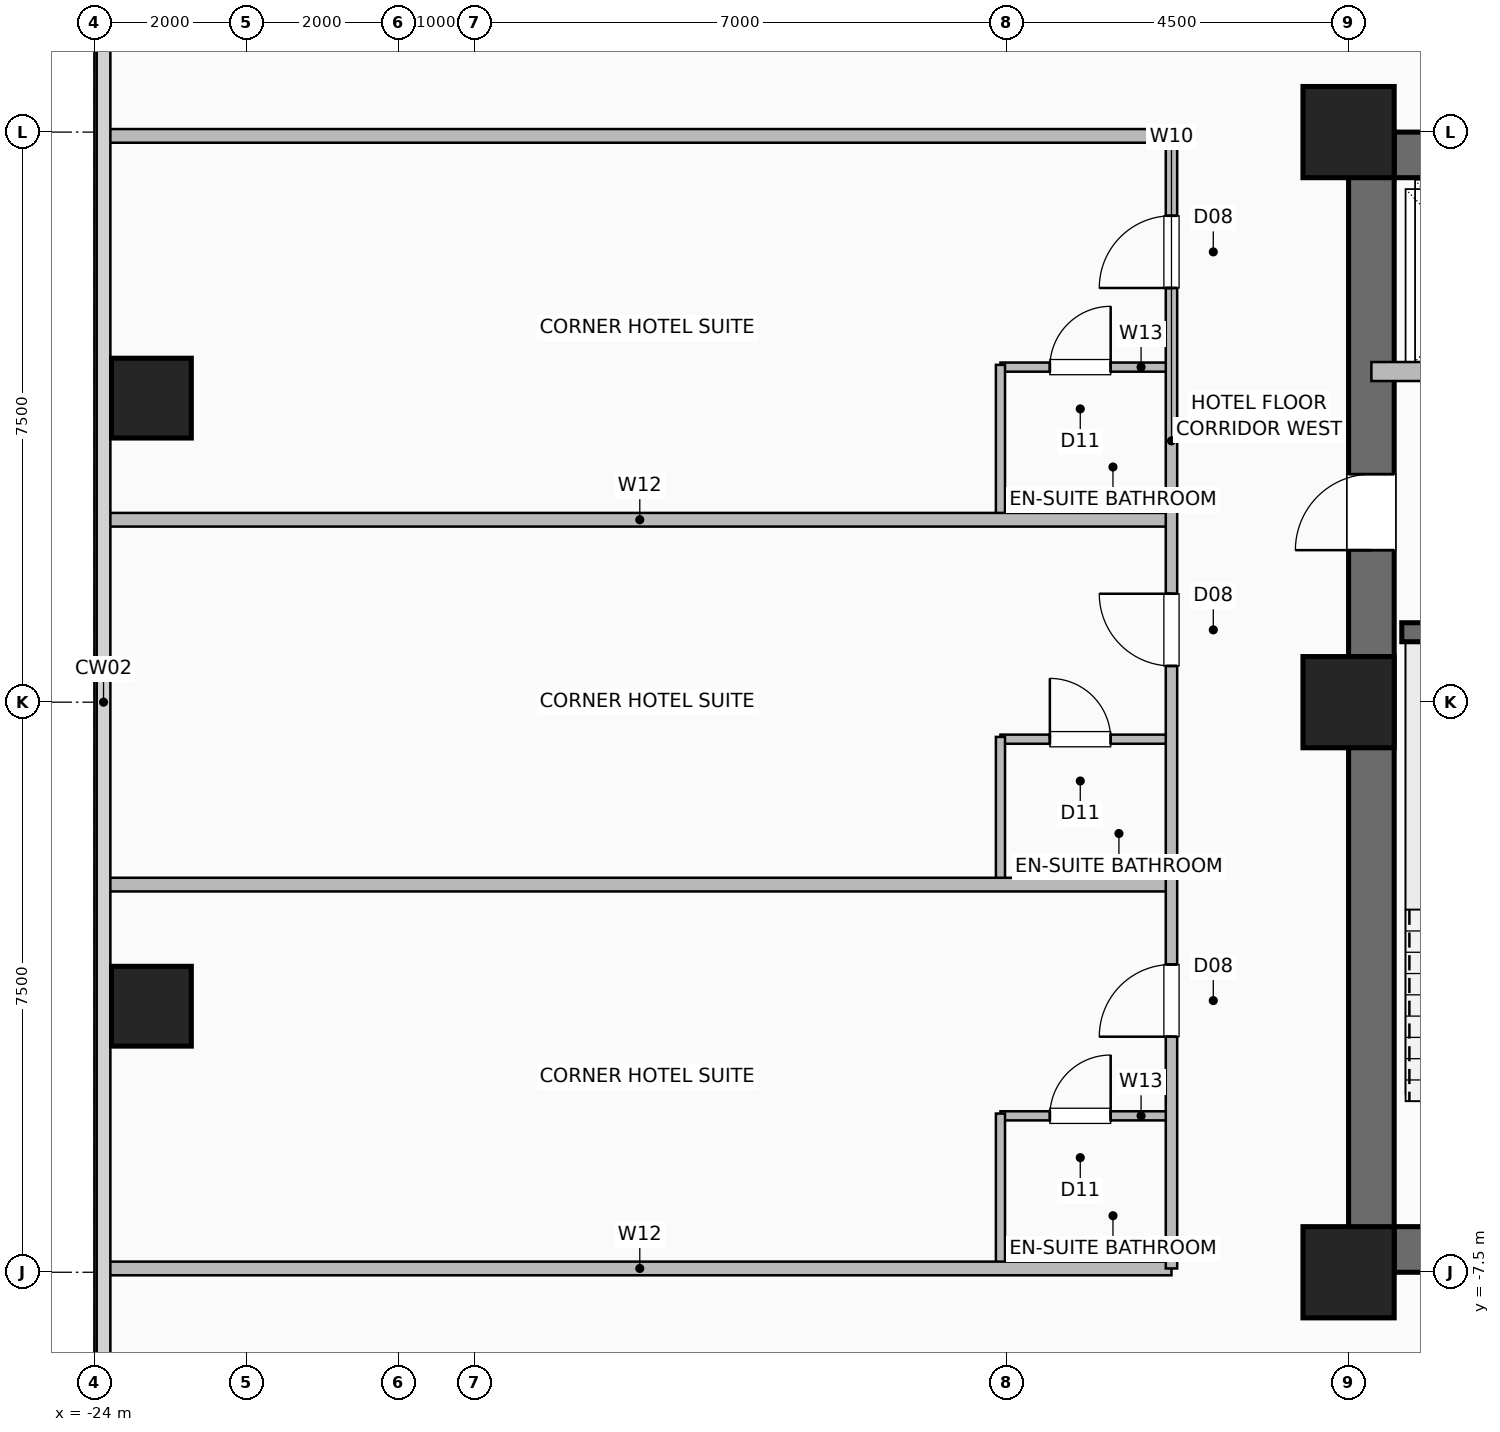
"""IFC4 building model, lengths in metres.
Left out: names, types, materials, properties, quantities, classifications, styles, units other than length and angle.
Written with IfcOpenShell. Run it as: python <this file> out.ifc"""

import sys

from ifc_helpers import new_model, si_unit, direction, frame, frame_2d, origin, origin_2d, place, context, subcontext, project, spatial, rectangle, hollow_rectangle, extrude, element, fill, save


model = new_model("IFC4")
c1 = context("Model", 3, precision=1e-05, world=origin(), true_north=direction((0.0, 1.0)))
c2 = subcontext(c1, "Body", "Model", "MODEL_VIEW")
j1 = project(units=[si_unit("LENGTHUNIT", "METRE"), si_unit("PLANEANGLEUNIT", "RADIAN")], contexts=[c1])
p1 = place(None, origin())
s1 = spatial("IfcSite", under=j1, at=p1, CompositionType="ELEMENT")
p2 = place(p1, origin())
s2 = spatial("IfcBuilding", under=s1, at=p2, CompositionType="ELEMENT")
p3 = place(p2, frame((0.0, 0.0, 51.5)))
s3 = spatial("IfcBuildingStorey", under=s2, at=p3, CompositionType="ELEMENT", Elevation=51.5)
for number, where, z_axis, x_axis in (
    (1, (-7.5, -7.5, 0.0), (0.0, 0.0, 1.0), (1.0, 0.0, 0.0)),
    (2, (-7.5, 7.5, 0.0), (0.0, 0.0, 1.0), (1.0, 0.0, 0.0)),
    (3, (-7.5, 0.0, 0.0), (0.0, 0.0, 1.0), (1.0, 0.0, 0.0)),
):
    element("IfcColumn", number, at=place(p3, frame(where, z_axis=z_axis, x_axis=x_axis)), inside=s3, PredefinedType="COLUMN", context=c2, shape_type="SweptSolid", body=[
        extrude(hollow_rectangle(XDim=1.2, YDim=1.2, WallThickness=0.055, at=origin_2d()), origin(), (0.0, 0.0, 1.0), 3.5),
    ])
for number, where, z_axis, x_axis in (
    (4, (-23.25, -4.0, 0.0), (0.0, 0.0, 1.0), (1.0, 0.0, 0.0)),
    (5, (-23.25, 4.0, 0.0), (0.0, 0.0, 1.0), (1.0, 0.0, 0.0)),
):
    element("IfcColumn", number, at=place(p3, frame(where, z_axis=z_axis, x_axis=x_axis)), inside=s3, PredefinedType="COLUMN", context=c2, shape_type="SweptSolid", body=[
        extrude(hollow_rectangle(XDim=1.05, YDim=1.05, WallThickness=0.05, at=origin_2d()), origin(), (0.0, 0.0, 1.0), 3.5),
    ])
p4 = place(p3, frame((-7.5, -7.2, 0.0), z_axis=(0.0, 0.0, 1.0), x_axis=(1.0, 0.0, 0.0)))
e6 = element("IfcWall", 6, at=p4, inside=s3, PredefinedType="SHEAR", context=c2, shape_type="SweptSolid", body=[
    extrude(rectangle(XDim=15.0, YDim=0.6, at=frame_2d((7.5, 0.0))), origin(), (0.0, 0.0, 1.0), 3.25),
])
p5 = place(p4, frame((1.55, 0.0, 0.0)))
e7 = element("IfcOpeningElement", 7, at=p5, cuts=e6, PredefinedType="OPENING", context=c2, shape_type="SweptSolid", body=[
    extrude(rectangle(XDim=1.05, YDim=2.08, at=frame_2d((0.525, 1.04))), frame((0.0, 0.31, 0.0), z_axis=(0.0, -1.0, 0.0), x_axis=(1.0, 0.0, 0.0)), (0.0, 0.0, 1.0), 0.62),
])
p6 = place(p4, frame((12.4, 0.0, 0.0)))
e8 = element("IfcOpeningElement", 8, at=p6, cuts=e6, PredefinedType="OPENING", context=c2, shape_type="SweptSolid", body=[
    extrude(rectangle(XDim=1.05, YDim=2.08, at=frame_2d((0.525, 1.04))), frame((0.0, 0.31, 0.0), z_axis=(0.0, -1.0, 0.0), x_axis=(1.0, 0.0, 0.0)), (0.0, 0.0, 1.0), 0.62),
])
p7 = place(p4, frame((4.64, 0.0, 0.0)))
e9 = element("IfcOpeningElement", 9, at=p7, cuts=e6, PredefinedType="OPENING", context=c2, shape_type="SweptSolid", body=[
    extrude(rectangle(XDim=1.1, YDim=2.2, at=frame_2d((0.55, 1.1))), frame((0.0, 0.31, 0.0), z_axis=(0.0, -1.0, 0.0), x_axis=(1.0, 0.0, 0.0)), (0.0, 0.0, 1.0), 0.62),
])
p8 = place(p4, frame((6.52, 0.0, 0.0)))
e10 = element("IfcOpeningElement", 10, at=p8, cuts=e6, PredefinedType="OPENING", context=c2, shape_type="SweptSolid", body=[
    extrude(rectangle(XDim=1.1, YDim=2.2, at=frame_2d((0.55, 1.1))), frame((0.0, 0.31, 0.0), z_axis=(0.0, -1.0, 0.0), x_axis=(1.0, 0.0, 0.0)), (0.0, 0.0, 1.0), 0.62),
])
p9 = place(p4, frame((8.4, 0.0, 0.0)))
e11 = element("IfcOpeningElement", 11, at=p9, cuts=e6, PredefinedType="OPENING", context=c2, shape_type="SweptSolid", body=[
    extrude(rectangle(XDim=1.1, YDim=2.2, at=frame_2d((0.55, 1.1))), frame((0.0, 0.31, 0.0), z_axis=(0.0, -1.0, 0.0), x_axis=(1.0, 0.0, 0.0)), (0.0, 0.0, 1.0), 0.62),
])
p10 = place(p3, frame((-7.5, 7.2, 0.0), z_axis=(0.0, 0.0, 1.0), x_axis=(1.0, 0.0, 0.0)))
e12 = element("IfcWall", 12, at=p10, inside=s3, PredefinedType="SHEAR", context=c2, shape_type="SweptSolid", body=[
    extrude(rectangle(XDim=15.0, YDim=0.6, at=frame_2d((7.5, 0.0))), origin(), (0.0, 0.0, 1.0), 3.25),
])
p11 = place(p3, frame((-7.2, -7.5, 0.0), z_axis=(0.0, 0.0, 1.0), x_axis=(0.0, 1.0, 0.0)))
e13 = element("IfcWall", 13, at=p11, inside=s3, PredefinedType="SHEAR", context=c2, shape_type="SweptSolid", body=[
    extrude(rectangle(XDim=15.0, YDim=0.6, at=frame_2d((7.5, 0.0))), origin(), (0.0, 0.0, 1.0), 3.25),
])
p12 = place(p11, frame((9.5, 0.0, 0.0)))
e14 = element("IfcOpeningElement", 14, at=p12, cuts=e13, PredefinedType="OPENING", context=c2, shape_type="SweptSolid", body=[
    extrude(rectangle(XDim=1.0, YDim=2.08, at=frame_2d((0.5, 1.04))), frame((0.0, 0.31, 0.0), z_axis=(0.0, -1.0, 0.0), x_axis=(1.0, 0.0, 0.0)), (0.0, 0.0, 1.0), 0.62),
])
p13 = place(p3, frame((-6.8, 0.92, 0.0), z_axis=(0.0, 0.0, 1.0), x_axis=(1.0, 0.0, 0.0)))
e15 = element("IfcWall", 15, at=p13, inside=s3, PredefinedType="SHEAR", context=c2, shape_type="SweptSolid", body=[
    extrude(rectangle(XDim=3.33, YDim=0.25, at=frame_2d((1.665, 0.0))), origin(), (0.0, 0.0, 1.0), 3.25),
])
p14 = place(p3, frame((-7.2, 4.35, 0.0), z_axis=(0.0, 0.0, 1.0), x_axis=(1.0, 0.0, 0.0)))
e16 = element("IfcWall", 16, at=p14, inside=s3, PredefinedType="SHEAR", context=c2, shape_type="SweptSolid", body=[
    extrude(rectangle(XDim=2.7, YDim=0.25, at=frame_2d((1.35, 0.0))), origin(), (0.0, 0.0, 1.0), 3.25),
])
p15 = place(p14, frame((0.75, 0.0, 0.0)))
e17 = element("IfcOpeningElement", 17, at=p15, cuts=e16, PredefinedType="OPENING", context=c2, shape_type="SweptSolid", body=[
    extrude(rectangle(XDim=1.2, YDim=2.2, at=frame_2d((0.6, 1.1))), frame((0.0, 0.135, 0.0), z_axis=(0.0, -1.0, 0.0), x_axis=(1.0, 0.0, 0.0)), (0.0, 0.0, 1.0), 0.27),
])
p16 = place(p3, frame((-12.08, -5.442, 0.0), z_axis=(0.0, 0.0, 1.0), x_axis=(1.0, 0.0, 0.0)))
e18 = element("IfcWall", 18, at=p16, inside=s3, PredefinedType="PLUMBINGWALL", context=c2, shape_type="SweptSolid", body=[
    extrude(rectangle(XDim=2.25, YDim=0.12, at=frame_2d((1.125, 0.0))), origin(), (0.0, 0.0, 1.0), 3.25),
])
p17 = place(p16, frame((0.65, 0.0, 0.0)))
e19 = element("IfcOpeningElement", 19, at=p17, cuts=e18, PredefinedType="OPENING", context=c2, shape_type="SweptSolid", body=[
    extrude(rectangle(XDim=0.8, YDim=2.05, at=frame_2d((0.4, 1.025))), frame((0.0, 0.07, 0.0), z_axis=(0.0, -1.0, 0.0), x_axis=(1.0, 0.0, 0.0)), (0.0, 0.0, 1.0), 0.14),
])
p18 = place(p3, frame((-12.08, -7.42, 0.0), z_axis=(0.0, 0.0, 1.0), x_axis=(0.0, 1.0, 0.0)))
e20 = element("IfcWall", 20, at=p18, inside=s3, PredefinedType="PLUMBINGWALL", context=c2, shape_type="SweptSolid", body=[
    extrude(rectangle(XDim=2.008, YDim=0.12, at=frame_2d((1.004, 0.0))), origin(), (0.0, 0.0, 1.0), 3.25),
])
p19 = place(p3, frame((-12.08, -0.487, 0.0), z_axis=(0.0, 0.0, 1.0), x_axis=(1.0, 0.0, 0.0)))
e21 = element("IfcWall", 21, at=p19, inside=s3, PredefinedType="PLUMBINGWALL", context=c2, shape_type="SweptSolid", body=[
    extrude(rectangle(XDim=2.25, YDim=0.12, at=frame_2d((1.125, 0.0))), origin(), (0.0, 0.0, 1.0), 3.25),
])
p20 = place(p19, frame((0.65, 0.0, 0.0)))
e22 = element("IfcOpeningElement", 22, at=p20, cuts=e21, PredefinedType="OPENING", context=c2, shape_type="SweptSolid", body=[
    extrude(rectangle(XDim=0.8, YDim=2.05, at=frame_2d((0.4, 1.025))), frame((0.0, 0.07, 0.0), z_axis=(0.0, -1.0, 0.0), x_axis=(1.0, 0.0, 0.0)), (0.0, 0.0, 1.0), 0.14),
])
p21 = place(p3, frame((-12.08, -2.37, 0.0), z_axis=(0.0, 0.0, 1.0), x_axis=(0.0, 1.0, 0.0)))
e23 = element("IfcWall", 23, at=p21, inside=s3, PredefinedType="PLUMBINGWALL", context=c2, shape_type="SweptSolid", body=[
    extrude(rectangle(XDim=1.913, YDim=0.12, at=frame_2d((0.957, 0.0))), origin(), (0.0, 0.0, 1.0), 3.25),
])
p22 = place(p3, frame((-12.08, 4.408, 0.0), z_axis=(0.0, 0.0, 1.0), x_axis=(1.0, 0.0, 0.0)))
e24 = element("IfcWall", 24, at=p22, inside=s3, PredefinedType="PLUMBINGWALL", context=c2, shape_type="SweptSolid", body=[
    extrude(rectangle(XDim=2.25, YDim=0.12, at=frame_2d((1.125, 0.0))), origin(), (0.0, 0.0, 1.0), 3.25),
])
p23 = place(p22, frame((0.65, 0.0, 0.0)))
e25 = element("IfcOpeningElement", 25, at=p23, cuts=e24, PredefinedType="OPENING", context=c2, shape_type="SweptSolid", body=[
    extrude(rectangle(XDim=0.8, YDim=2.05, at=frame_2d((0.4, 1.025))), frame((0.0, 0.07, 0.0), z_axis=(0.0, -1.0, 0.0), x_axis=(1.0, 0.0, 0.0)), (0.0, 0.0, 1.0), 0.14),
])
p24 = place(p3, frame((-12.08, 2.43, 0.0), z_axis=(0.0, 0.0, 1.0), x_axis=(0.0, 1.0, 0.0)))
e26 = element("IfcWall", 26, at=p24, inside=s3, PredefinedType="PLUMBINGWALL", context=c2, shape_type="SweptSolid", body=[
    extrude(rectangle(XDim=2.008, YDim=0.12, at=frame_2d((1.004, 0.0))), origin(), (0.0, 0.0, 1.0), 3.25),
])
for number, where, z_axis, x_axis in (
    (27, (-23.82, -7.45, 0.0), (0.0, 0.0, 1.0), (1.0, 0.0, 0.0)),
    (28, (-23.82, -2.4, 0.0), (0.0, 0.0, 1.0), (1.0, 0.0, 0.0)),
    (29, (-23.82, 2.4, 0.0), (0.0, 0.0, 1.0), (1.0, 0.0, 0.0)),
    (30, (-23.82, 7.45, 0.0), (0.0, 0.0, 1.0), (1.0, 0.0, 0.0)),
):
    element("IfcWall", number, at=place(p3, frame(where, z_axis=z_axis, x_axis=x_axis)), inside=s3, PredefinedType="PARTITIONING", context=c2, shape_type="SweptSolid", body=[
        extrude(rectangle(XDim=13.99, YDim=0.18, at=frame_2d((6.995, 0.0))), origin(), (0.0, 0.0, 1.0), 3.25),
    ])
p25 = place(p3, frame((-9.83, -7.45, 0.0), z_axis=(0.0, 0.0, 1.0), x_axis=(0.0, 1.0, 0.0)))
e31 = element("IfcWall", 31, at=p25, inside=s3, PredefinedType="PARTITIONING", context=c2, shape_type="SweptSolid", body=[
    extrude(rectangle(XDim=14.9, YDim=0.15, at=frame_2d((7.45, 0.0))), origin(), (0.0, 0.0, 1.0), 3.25),
])
p26 = place(p25, frame((3.049, 0.0, 0.0)))
e32 = element("IfcOpeningElement", 32, at=p26, cuts=e31, PredefinedType="OPENING", context=c2, shape_type="SweptSolid", body=[
    extrude(rectangle(XDim=0.95, YDim=2.08, at=frame_2d((0.475, 1.04))), frame((0.0, 0.085, 0.0), z_axis=(0.0, -1.0, 0.0), x_axis=(1.0, 0.0, 0.0)), (0.0, 0.0, 1.0), 0.17),
])
p27 = place(p25, frame((7.927, 0.0, 0.0)))
e33 = element("IfcOpeningElement", 33, at=p27, cuts=e31, PredefinedType="OPENING", context=c2, shape_type="SweptSolid", body=[
    extrude(rectangle(XDim=0.95, YDim=2.08, at=frame_2d((0.475, 1.04))), frame((0.0, 0.085, 0.0), z_axis=(0.0, -1.0, 0.0), x_axis=(1.0, 0.0, 0.0)), (0.0, 0.0, 1.0), 0.17),
])
p28 = place(p25, frame((12.899, 0.0, 0.0)))
e34 = element("IfcOpeningElement", 34, at=p28, cuts=e31, PredefinedType="OPENING", context=c2, shape_type="SweptSolid", body=[
    extrude(rectangle(XDim=0.95, YDim=2.08, at=frame_2d((0.475, 1.04))), frame((0.0, 0.085, 0.0), z_axis=(0.0, -1.0, 0.0), x_axis=(1.0, 0.0, 0.0)), (0.0, 0.0, 1.0), 0.17),
])
p29 = place(p12, origin())
e35 = element("IfcDoor", 35, at=p29, inside=s3, OperationType="SINGLE_SWING_LEFT", PredefinedType="DOOR", context=c2, shape_type="SweptSolid", body=[
    extrude(rectangle(XDim=1.0, YDim=2.08, at=frame_2d((0.5, 1.04))), frame((0.0, 0.025, 0.0), z_axis=(0.0, -1.0, 0.0), x_axis=(1.0, 0.0, 0.0)), (0.0, 0.0, 1.0), 0.05),
])
fill(e14, e35)
p30 = place(p17, origin())
e36 = element("IfcDoor", 36, at=p30, inside=s3, OperationType="SINGLE_SWING_RIGHT", PredefinedType="DOOR", context=c2, shape_type="SweptSolid", body=[
    extrude(rectangle(XDim=0.8, YDim=2.05, at=frame_2d((0.4, 1.025))), frame((0.0, 0.025, 0.0), z_axis=(0.0, -1.0, 0.0), x_axis=(1.0, 0.0, 0.0)), (0.0, 0.0, 1.0), 0.05),
])
fill(e19, e36)
p31 = place(p20, origin())
e37 = element("IfcDoor", 37, at=p31, inside=s3, OperationType="SINGLE_SWING_LEFT", PredefinedType="DOOR", context=c2, shape_type="SweptSolid", body=[
    extrude(rectangle(XDim=0.8, YDim=2.05, at=frame_2d((0.4, 1.025))), frame((0.0, 0.025, 0.0), z_axis=(0.0, -1.0, 0.0), x_axis=(1.0, 0.0, 0.0)), (0.0, 0.0, 1.0), 0.05),
])
fill(e22, e37)
p32 = place(p23, origin())
e38 = element("IfcDoor", 38, at=p32, inside=s3, OperationType="SINGLE_SWING_RIGHT", PredefinedType="DOOR", context=c2, shape_type="SweptSolid", body=[
    extrude(rectangle(XDim=0.8, YDim=2.05, at=frame_2d((0.4, 1.025))), frame((0.0, 0.025, 0.0), z_axis=(0.0, -1.0, 0.0), x_axis=(1.0, 0.0, 0.0)), (0.0, 0.0, 1.0), 0.05),
])
fill(e25, e38)
p33 = place(p26, origin())
e39 = element("IfcDoor", 39, at=p33, inside=s3, OperationType="SINGLE_SWING_LEFT", PredefinedType="DOOR", context=c2, shape_type="SweptSolid", body=[
    extrude(rectangle(XDim=0.95, YDim=2.08, at=frame_2d((0.475, 1.04))), frame((0.0, 0.025, 0.0), z_axis=(0.0, -1.0, 0.0), x_axis=(1.0, 0.0, 0.0)), (0.0, 0.0, 1.0), 0.05),
])
fill(e32, e39)
p34 = place(p27, origin())
e40 = element("IfcDoor", 40, at=p34, inside=s3, OperationType="SINGLE_SWING_RIGHT", PredefinedType="DOOR", context=c2, shape_type="SweptSolid", body=[
    extrude(rectangle(XDim=0.95, YDim=2.08, at=frame_2d((0.475, 1.04))), frame((0.0, 0.025, 0.0), z_axis=(0.0, -1.0, 0.0), x_axis=(1.0, 0.0, 0.0)), (0.0, 0.0, 1.0), 0.05),
])
fill(e33, e40)
p35 = place(p28, origin())
e41 = element("IfcDoor", 41, at=p35, inside=s3, OperationType="SINGLE_SWING_LEFT", PredefinedType="DOOR", context=c2, shape_type="SweptSolid", body=[
    extrude(rectangle(XDim=0.95, YDim=2.08, at=frame_2d((0.475, 1.04))), frame((0.0, 0.025, 0.0), z_axis=(0.0, -1.0, 0.0), x_axis=(1.0, 0.0, 0.0)), (0.0, 0.0, 1.0), 0.05),
])
fill(e34, e41)
save(model, sys.argv[1])
